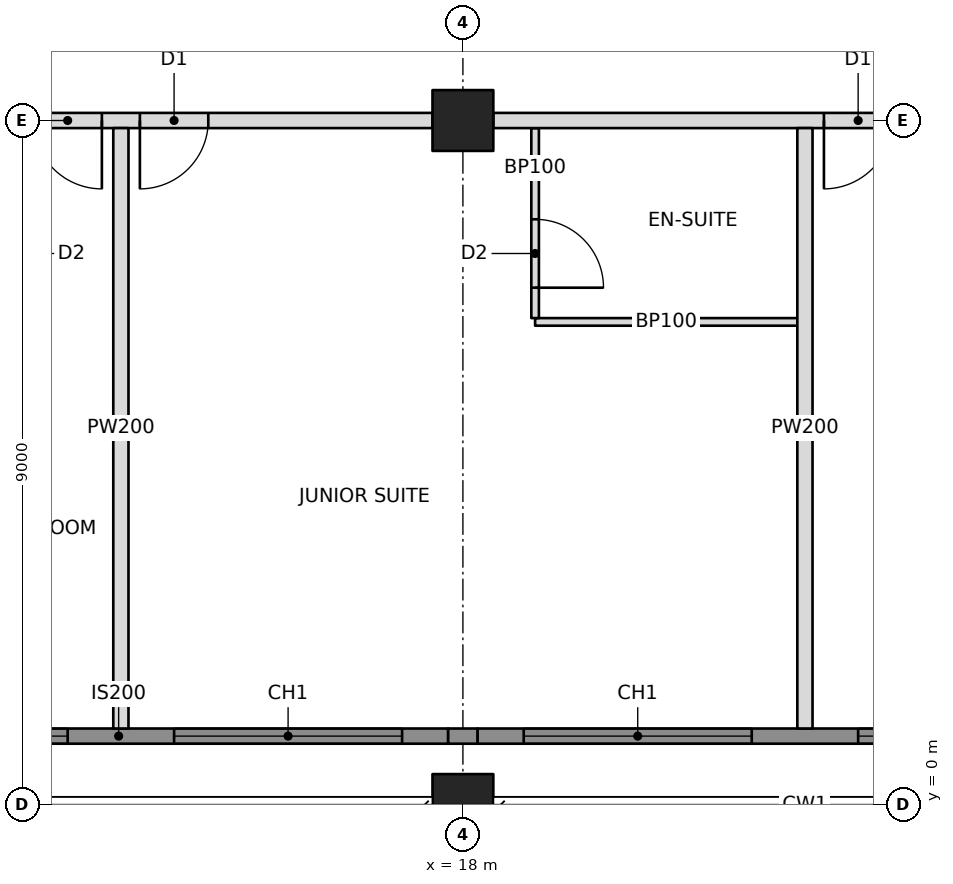
"""IFC4 building model, lengths in metres.
Left out: names, types, materials, properties, quantities, classifications, styles, units other than length and angle.
Written with IfcOpenShell. Run it as: python <this file> out.ifc"""

import sys

from ifc_helpers import new_model, si_unit, direction, frame, frame_2d, origin, origin_2d, place, context, subcontext, project, spatial, rectangle, hollow_rectangle, extrude, element, fill, save


model = new_model("IFC4")
c1 = context("Model", 3, precision=1e-05, world=origin(), true_north=direction((0.0, 1.0)))
c2 = subcontext(c1, "Body", "Model", "MODEL_VIEW")
j1 = project(units=[si_unit("LENGTHUNIT", "METRE"), si_unit("PLANEANGLEUNIT", "RADIAN")], contexts=[c1])
p1 = place(None, origin())
s1 = spatial("IfcSite", under=j1, at=p1, CompositionType="ELEMENT")
p2 = place(p1, origin())
s2 = spatial("IfcBuilding", under=s1, at=p2, CompositionType="ELEMENT")
p3 = place(p2, frame((0.0, 0.0, 211.4)))
s3 = spatial("IfcBuildingStorey", under=s2, at=p3, CompositionType="ELEMENT", Elevation=211.4)
p4 = place(p3, frame((18.0, 0.0, 0.0), z_axis=(0.0, 0.0, 1.0), x_axis=(1.0, 0.0, 0.0)))
e1 = element("IfcColumn", 1, at=p4, inside=s3, PredefinedType="COLUMN", context=c2, shape_type="SweptSolid", body=[
    extrude(hollow_rectangle(XDim=0.8, YDim=0.8, WallThickness=0.06, at=origin_2d()), origin(), (0.0, 0.0, 1.0), 3.4),
])
p5 = place(p3, frame((18.0, 9.0, 0.0), z_axis=(0.0, 0.0, 1.0), x_axis=(1.0, 0.0, 0.0)))
e2 = element("IfcColumn", 2, at=p5, inside=s3, PredefinedType="COLUMN", context=c2, shape_type="SweptSolid", body=[
    extrude(hollow_rectangle(XDim=0.8, YDim=0.8, WallThickness=0.05, at=origin_2d()), origin(), (0.0, 0.0, 1.0), 3.4),
])
p6 = place(p3, frame((9.4, 9.0, 0.0), z_axis=(0.0, 0.0, 1.0), x_axis=(1.0, 0.0, 0.0)))
e3 = element("IfcWall", 3, at=p6, inside=s3, PredefinedType="PARTITIONING", context=c2, shape_type="SweptSolid", body=[
    extrude(rectangle(XDim=8.2, YDim=0.2, at=frame_2d((4.1, 0.0))), origin(), (0.0, 0.0, 1.0), 2.405),
])
p7 = place(p6, frame((2.95, 0.0, 0.0)))
e4 = element("IfcOpeningElement", 4, at=p7, cuts=e3, PredefinedType="OPENING", context=c2, shape_type="SweptSolid", body=[
    extrude(rectangle(XDim=0.9, YDim=2.1, at=frame_2d((0.45, 1.05))), frame((0.0, 0.11, 0.0), z_axis=(0.0, -1.0, 0.0), x_axis=(1.0, 0.0, 0.0)), (0.0, 0.0, 1.0), 0.22),
])
p8 = place(p6, frame((4.35, 0.0, 0.0)))
e5 = element("IfcOpeningElement", 5, at=p8, cuts=e3, PredefinedType="OPENING", context=c2, shape_type="SweptSolid", body=[
    extrude(rectangle(XDim=0.9, YDim=2.1, at=frame_2d((0.45, 1.05))), frame((0.0, 0.11, 0.0), z_axis=(0.0, -1.0, 0.0), x_axis=(1.0, 0.0, 0.0)), (0.0, 0.0, 1.0), 0.22),
])
p9 = place(p3, frame((18.4, 9.0, 0.0), z_axis=(0.0, 0.0, 1.0), x_axis=(1.0, 0.0, 0.0)))
e6 = element("IfcWall", 6, at=p9, inside=s3, PredefinedType="PARTITIONING", context=c2, shape_type="SweptSolid", body=[
    extrude(rectangle(XDim=8.2, YDim=0.2, at=frame_2d((4.1, 0.0))), origin(), (0.0, 0.0, 1.0), 2.405),
])
p10 = place(p9, frame((4.35, 0.0, 0.0)))
e7 = element("IfcOpeningElement", 7, at=p10, cuts=e6, PredefinedType="OPENING", context=c2, shape_type="SweptSolid", body=[
    extrude(rectangle(XDim=0.9, YDim=2.1, at=frame_2d((0.45, 1.05))), frame((0.0, 0.11, 0.0), z_axis=(0.0, -1.0, 0.0), x_axis=(1.0, 0.0, 0.0)), (0.0, 0.0, 1.0), 0.22),
])
for number, where, z_axis, x_axis in (
    (8, (13.5, 8.9, 0.0), (0.0, 0.0, 1.0), (0.0, -1.0, 0.0)),
    (9, (22.5, 8.9, 0.0), (0.0, 0.0, 1.0), (0.0, -1.0, 0.0)),
):
    element("IfcWall", number, at=place(p3, frame(where, z_axis=z_axis, x_axis=x_axis)), inside=s3, PredefinedType="PARTITIONING", context=c2, shape_type="SweptSolid", body=[
        extrude(rectangle(XDim=7.9, YDim=0.2, at=frame_2d((3.95, 0.0))), origin(), (0.0, 0.0, 1.0), 2.404),
    ])
p11 = place(p3, frame((18.95, 6.35, 0.0), z_axis=(0.0, 0.0, 1.0), x_axis=(1.0, 0.0, 0.0)))
e10 = element("IfcWall", 10, at=p11, inside=s3, PredefinedType="PARTITIONING", context=c2, shape_type="SweptSolid", body=[
    extrude(rectangle(XDim=3.45, YDim=0.1, at=frame_2d((1.725, 0.0))), origin(), (0.0, 0.0, 1.0), 3.2),
])
p12 = place(p3, frame((18.95, 8.9, 0.0), z_axis=(0.0, 0.0, 1.0), x_axis=(0.0, -1.0, 0.0)))
e11 = element("IfcWall", 11, at=p12, inside=s3, PredefinedType="PARTITIONING", context=c2, shape_type="SweptSolid", body=[
    extrude(rectangle(XDim=2.5, YDim=0.1, at=frame_2d((1.25, 0.0))), origin(), (0.0, 0.0, 1.0), 2.404),
])
p13 = place(p12, frame((1.2, 0.0, 0.0)))
e12 = element("IfcOpeningElement", 12, at=p13, cuts=e11, PredefinedType="OPENING", context=c2, shape_type="SweptSolid", body=[
    extrude(rectangle(XDim=0.9, YDim=2.1, at=frame_2d((0.45, 1.05))), frame((0.0, 0.06, 0.0), z_axis=(0.0, -1.0, 0.0), x_axis=(1.0, 0.0, 0.0)), (0.0, 0.0, 1.0), 0.12),
])
p14 = place(p3, frame((9.135, 0.9, 0.0), z_axis=(0.0, 0.0, 1.0), x_axis=(1.0, 0.0, 0.0)))
e13 = element("IfcWall", 13, at=p14, inside=s3, PredefinedType="SOLIDWALL", context=c2, shape_type="SweptSolid", body=[
    extrude(rectangle(XDim=8.671, YDim=0.2, at=frame_2d((4.335, 0.0))), origin(), (0.0, 0.0, 1.0), 3.2),
])
p15 = place(p14, frame((0.665, 0.0, 0.6)))
e14 = element("IfcOpeningElement", 14, at=p15, cuts=e13, PredefinedType="OPENING", context=c2, shape_type="SweptSolid", body=[
    extrude(rectangle(XDim=3.0, YDim=2.2, at=frame_2d((1.5, 1.1))), frame((0.0, 0.11, 0.0), z_axis=(0.0, -1.0, 0.0), x_axis=(1.0, 0.0, 0.0)), (0.0, 0.0, 1.0), 0.22),
])
p16 = place(p14, frame((5.065, 0.0, 0.6)))
e15 = element("IfcOpeningElement", 15, at=p16, cuts=e13, PredefinedType="OPENING", context=c2, shape_type="SweptSolid", body=[
    extrude(rectangle(XDim=3.0, YDim=2.2, at=frame_2d((1.5, 1.1))), frame((0.0, 0.11, 0.0), z_axis=(0.0, -1.0, 0.0), x_axis=(1.0, 0.0, 0.0)), (0.0, 0.0, 1.0), 0.22),
])
p17 = place(p3, frame((17.806, 0.9, 0.0), z_axis=(0.0, 0.0, 1.0), x_axis=(1.0, 0.0, 0.0)))
e16 = element("IfcWall", 16, at=p17, inside=s3, PredefinedType="SOLIDWALL", context=c2, shape_type="SweptSolid", body=[
    extrude(rectangle(XDim=0.388, YDim=0.2, at=frame_2d((0.194, 0.0))), origin(), (0.0, 0.0, 1.0), 2.404),
])
p18 = place(p3, frame((18.194, 0.9, 0.0), z_axis=(0.0, 0.0, 1.0), x_axis=(1.0, 0.0, 0.0)))
e17 = element("IfcWall", 17, at=p18, inside=s3, PredefinedType="SOLIDWALL", context=c2, shape_type="SweptSolid", body=[
    extrude(rectangle(XDim=8.612, YDim=0.2, at=frame_2d((4.306, 0.0))), origin(), (0.0, 0.0, 1.0), 3.2),
])
p19 = place(p18, frame((0.606, 0.0, 0.6)))
e18 = element("IfcOpeningElement", 18, at=p19, cuts=e17, PredefinedType="OPENING", context=c2, shape_type="SweptSolid", body=[
    extrude(rectangle(XDim=3.0, YDim=2.2, at=frame_2d((1.5, 1.1))), frame((0.0, 0.11, 0.0), z_axis=(0.0, -1.0, 0.0), x_axis=(1.0, 0.0, 0.0)), (0.0, 0.0, 1.0), 0.22),
])
p20 = place(p18, frame((5.006, 0.0, 0.6)))
e19 = element("IfcOpeningElement", 19, at=p20, cuts=e17, PredefinedType="OPENING", context=c2, shape_type="SweptSolid", body=[
    extrude(rectangle(XDim=3.0, YDim=2.2, at=frame_2d((1.5, 1.1))), frame((0.0, 0.11, 0.0), z_axis=(0.0, -1.0, 0.0), x_axis=(1.0, 0.0, 0.0)), (0.0, 0.0, 1.0), 0.22),
])
p21 = place(p15, origin())
e20 = element("IfcWindow", 20, at=p21, inside=s3, PartitioningType="TRIPLE_PANEL_VERTICAL", PredefinedType="WINDOW", context=c2, shape_type="SweptSolid", body=[
    extrude(rectangle(XDim=3.0, YDim=2.2, at=frame_2d((1.5, 1.1))), frame((0.0, 0.03, 0.0), z_axis=(0.0, -1.0, 0.0), x_axis=(1.0, 0.0, 0.0)), (0.0, 0.0, 1.0), 0.06),
])
fill(e14, e20)
p22 = place(p16, origin())
e21 = element("IfcWindow", 21, at=p22, inside=s3, PartitioningType="TRIPLE_PANEL_VERTICAL", PredefinedType="WINDOW", context=c2, shape_type="SweptSolid", body=[
    extrude(rectangle(XDim=3.0, YDim=2.2, at=frame_2d((1.5, 1.1))), frame((0.0, 0.03, 0.0), z_axis=(0.0, -1.0, 0.0), x_axis=(1.0, 0.0, 0.0)), (0.0, 0.0, 1.0), 0.06),
])
fill(e15, e21)
p23 = place(p19, origin())
e22 = element("IfcWindow", 22, at=p23, inside=s3, PartitioningType="TRIPLE_PANEL_VERTICAL", PredefinedType="WINDOW", context=c2, shape_type="SweptSolid", body=[
    extrude(rectangle(XDim=3.0, YDim=2.2, at=frame_2d((1.5, 1.1))), frame((0.0, 0.03, 0.0), z_axis=(0.0, -1.0, 0.0), x_axis=(1.0, 0.0, 0.0)), (0.0, 0.0, 1.0), 0.06),
])
fill(e18, e22)
p24 = place(p20, origin())
e23 = element("IfcWindow", 23, at=p24, inside=s3, PartitioningType="TRIPLE_PANEL_VERTICAL", PredefinedType="WINDOW", context=c2, shape_type="SweptSolid", body=[
    extrude(rectangle(XDim=3.0, YDim=2.2, at=frame_2d((1.5, 1.1))), frame((0.0, 0.03, 0.0), z_axis=(0.0, -1.0, 0.0), x_axis=(1.0, 0.0, 0.0)), (0.0, 0.0, 1.0), 0.06),
])
fill(e19, e23)
p25 = place(p7, frame((0.9, 0.0, 0.0), z_axis=(0.0, 0.0, 1.0), x_axis=(-1.0, 0.0, 0.0)))
e24 = element("IfcDoor", 24, at=p25, inside=s3, OperationType="SINGLE_SWING_LEFT", PredefinedType="DOOR", context=c2, shape_type="SweptSolid", body=[
    extrude(rectangle(XDim=0.9, YDim=2.1, at=frame_2d((0.45, 1.05))), frame((0.0, 0.025, 0.0), z_axis=(0.0, -1.0, 0.0), x_axis=(1.0, 0.0, 0.0)), (0.0, 0.0, 1.0), 0.05),
])
fill(e4, e24)
p26 = place(p13, origin())
e25 = element("IfcDoor", 25, at=p26, inside=s3, OperationType="SINGLE_SWING_RIGHT", PredefinedType="DOOR", context=c2, shape_type="SweptSolid", body=[
    extrude(rectangle(XDim=0.9, YDim=2.1, at=frame_2d((0.45, 1.05))), frame((0.0, 0.025, 0.0), z_axis=(0.0, -1.0, 0.0), x_axis=(1.0, 0.0, 0.0)), (0.0, 0.0, 1.0), 0.05),
])
fill(e12, e25)
p27 = place(p8, frame((0.9, 0.0, 0.0), z_axis=(0.0, 0.0, 1.0), x_axis=(-1.0, 0.0, 0.0)))
e26 = element("IfcDoor", 26, at=p27, inside=s3, OperationType="SINGLE_SWING_RIGHT", PredefinedType="DOOR", context=c2, shape_type="SweptSolid", body=[
    extrude(rectangle(XDim=0.9, YDim=2.1, at=frame_2d((0.45, 1.05))), frame((0.0, 0.025, 0.0), z_axis=(0.0, -1.0, 0.0), x_axis=(1.0, 0.0, 0.0)), (0.0, 0.0, 1.0), 0.05),
])
fill(e5, e26)
p28 = place(p10, frame((0.9, 0.0, 0.0), z_axis=(0.0, 0.0, 1.0), x_axis=(-1.0, 0.0, 0.0)))
e27 = element("IfcDoor", 27, at=p28, inside=s3, OperationType="SINGLE_SWING_RIGHT", PredefinedType="DOOR", context=c2, shape_type="SweptSolid", body=[
    extrude(rectangle(XDim=0.9, YDim=2.1, at=frame_2d((0.45, 1.05))), frame((0.0, 0.025, 0.0), z_axis=(0.0, -1.0, 0.0), x_axis=(1.0, 0.0, 0.0)), (0.0, 0.0, 1.0), 0.05),
])
fill(e7, e27)
save(model, sys.argv[1])
